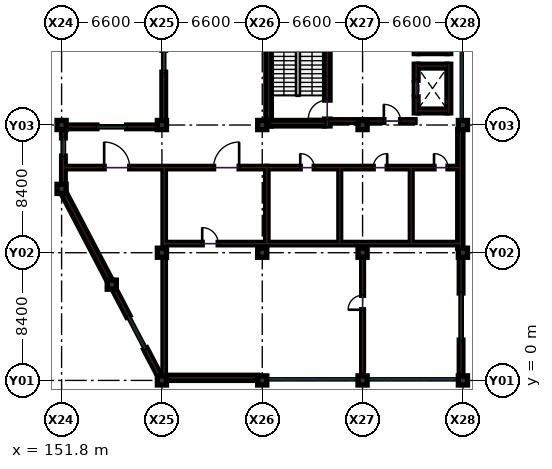
"""IFC4 building model, lengths in metres.
Left out: names, types, materials, properties, quantities, classifications, styles, units other than length and angle.
Written with IfcOpenShell. Run it as: python <this file> out.ifc"""

import sys

from ifc_helpers import new_model, si_unit, direction, frame, frame_2d, origin, origin_2d, place, context, subcontext, project, spatial, rectangle, extrude, element, fill, save


model = new_model("IFC4")
c1 = context("Model", 3, precision=1e-05, world=origin(), true_north=direction((0.0, 1.0)))
c2 = subcontext(c1, "Body", "Model", "MODEL_VIEW")
j1 = project(units=[si_unit("LENGTHUNIT", "METRE"), si_unit("PLANEANGLEUNIT", "RADIAN")], contexts=[c1])
p1 = place(None, origin())
s1 = spatial("IfcSite", under=j1, at=p1, CompositionType="ELEMENT")
p2 = place(p1, origin())
s2 = spatial("IfcBuilding", under=s1, at=p2, CompositionType="ELEMENT")
p3 = place(p2, frame((0.0, 0.0, 31.2)))
s3 = spatial("IfcBuildingStorey", under=s2, at=p3, CompositionType="ELEMENT", Elevation=31.2)
for number, where, z_axis, x_axis in (
    (1, (151.8, 16.8, 0.0), (0.0, 0.0, 1.0), (1.0, 0.0, 0.0)),
    (2, (158.4, 0.0, 0.0), (0.0, 0.0, 1.0), (1.0, 0.0, 0.0)),
    (3, (158.4, 8.4, 0.0), (0.0, 0.0, 1.0), (1.0, 0.0, 0.0)),
    (4, (158.4, 16.8, 0.0), (0.0, 0.0, 1.0), (1.0, 0.0, 0.0)),
    (5, (165.0, 0.0, 0.0), (0.0, 0.0, 1.0), (1.0, 0.0, 0.0)),
    (6, (165.0, 8.4, 0.0), (0.0, 0.0, 1.0), (1.0, 0.0, 0.0)),
    (7, (165.0, 16.8, 0.0), (0.0, 0.0, 1.0), (1.0, 0.0, 0.0)),
    (8, (171.6, 0.0, 0.0), (0.0, 0.0, 1.0), (1.0, 0.0, 0.0)),
    (9, (171.6, 8.4, 0.0), (0.0, 0.0, 1.0), (1.0, 0.0, 0.0)),
    (10, (171.6, 16.8, 0.0), (0.0, 0.0, 1.0), (1.0, 0.0, 0.0)),
    (11, (178.2, 0.0, 0.0), (0.0, 0.0, 1.0), (1.0, 0.0, 0.0)),
    (12, (178.2, 8.4, 0.0), (0.0, 0.0, 1.0), (1.0, 0.0, 0.0)),
    (13, (178.2, 16.8, 0.0), (0.0, 0.0, 1.0), (1.0, 0.0, 0.0)),
    (14, (151.8, 12.6, 0.0), (0.0, 0.0, 1.0), (1.0, 0.0, 0.0)),
    (15, (155.1, 6.3, 0.0), (0.0, 0.0, 1.0), (1.0, 0.0, 0.0)),
):
    element("IfcColumn", number, at=place(p3, frame(where, z_axis=z_axis, x_axis=x_axis)), inside=s3, PredefinedType="COLUMN", context=c2, shape_type="SweptSolid", body=[
        extrude(rectangle(XDim=0.6, YDim=0.6, at=origin_2d()), origin(), (0.0, 0.0, 1.0), 4.2),
    ])
p4 = place(p3, frame((165.3, 14.0, 0.0), z_axis=(0.0, 0.0, 1.0), x_axis=(1.0, 0.0, 0.0)))
e16 = element("IfcWall", 16, at=p4, inside=s3, PredefinedType="PARTITIONING", context=c2, shape_type="SweptSolid", body=[
    extrude(rectangle(XDim=12.7, YDim=0.16, at=frame_2d((6.35, 0.0))), origin(), (0.0, 0.0, 1.0), 3.23),
])
p5 = place(p4, frame((2.2, 0.0, 0.0)))
e17 = element("IfcOpeningElement", 17, at=p5, cuts=e16, PredefinedType="OPENING", context=c2, shape_type="SweptSolid", body=[
    extrude(rectangle(XDim=0.92, YDim=2.08, at=frame_2d((0.46, 1.04))), frame((0.0, 0.09, 0.0), z_axis=(0.0, -1.0, 0.0), x_axis=(1.0, 0.0, 0.0)), (0.0, 0.0, 1.0), 0.18),
])
p6 = place(p4, frame((7.0, 0.0, 0.0)))
e18 = element("IfcOpeningElement", 18, at=p6, cuts=e16, PredefinedType="OPENING", context=c2, shape_type="SweptSolid", body=[
    extrude(rectangle(XDim=0.92, YDim=2.08, at=frame_2d((0.46, 1.04))), frame((0.0, 0.09, 0.0), z_axis=(0.0, -1.0, 0.0), x_axis=(1.0, 0.0, 0.0)), (0.0, 0.0, 1.0), 0.18),
])
p7 = place(p4, frame((11.0, 0.0, 0.0)))
e19 = element("IfcOpeningElement", 19, at=p7, cuts=e16, PredefinedType="OPENING", context=c2, shape_type="SweptSolid", body=[
    extrude(rectangle(XDim=0.92, YDim=2.08, at=frame_2d((0.46, 1.04))), frame((0.0, 0.09, 0.0), z_axis=(0.0, -1.0, 0.0), x_axis=(1.0, 0.0, 0.0)), (0.0, 0.0, 1.0), 0.18),
])
p8 = place(p3, frame((165.3, 9.0, 0.0), z_axis=(0.0, 0.0, 1.0), x_axis=(1.0, 0.0, 0.0)))
e20 = element("IfcWall", 20, at=p8, inside=s3, PredefinedType="PARTITIONING", context=c2, shape_type="SweptSolid", body=[
    extrude(rectangle(XDim=12.7, YDim=0.16, at=frame_2d((6.35, 0.0))), origin(), (0.0, 0.0, 1.0), 3.23),
])
p9 = place(p3, frame((165.3, 9.0, 0.0), z_axis=(0.0, 0.0, 1.0), x_axis=(0.0, 1.0, 0.0)))
e21 = element("IfcWall", 21, at=p9, inside=s3, PredefinedType="PARTITIONING", context=c2, shape_type="SweptSolid", body=[
    extrude(rectangle(XDim=5.0, YDim=0.16, at=frame_2d((2.5, 0.0))), origin(), (0.0, 0.0, 1.0), 3.23),
])
for number, where, z_axis, x_axis in (
    (22, (170.1, 9.0, 0.0), (0.0, 0.0, 1.0), (0.0, 1.0, 0.0)),
    (23, (174.8, 9.0, 0.0), (0.0, 0.0, 1.0), (0.0, 1.0, 0.0)),
):
    element("IfcWall", number, at=place(p3, frame(where, z_axis=z_axis, x_axis=x_axis)), inside=s3, PredefinedType="PARTITIONING", context=c2, shape_type="SweptSolid", body=[
        extrude(rectangle(XDim=5.0, YDim=0.12, at=frame_2d((2.5, 0.0))), origin(), (0.0, 0.0, 1.0), 3.23),
    ])
p10 = place(p3, frame((158.55, 9.0, 0.0), z_axis=(0.0, 0.0, 1.0), x_axis=(1.0, 0.0, 0.0)))
e24 = element("IfcWall", 24, at=p10, inside=s3, PredefinedType="PARTITIONING", context=c2, shape_type="SweptSolid", body=[
    extrude(rectangle(XDim=6.75, YDim=0.16, at=frame_2d((3.375, 0.0))), origin(), (0.0, 0.0, 1.0), 3.23),
])
p11 = place(p10, frame((2.5, 0.0, 0.0)))
e25 = element("IfcOpeningElement", 25, at=p11, cuts=e24, PredefinedType="OPENING", context=c2, shape_type="SweptSolid", body=[
    extrude(rectangle(XDim=1.05, YDim=2.15, at=frame_2d((0.525, 1.075))), frame((0.0, 0.09, 0.0), z_axis=(0.0, -1.0, 0.0), x_axis=(1.0, 0.0, 0.0)), (0.0, 0.0, 1.0), 0.18),
])
p12 = place(p3, frame((171.6, 0.25, 0.0), z_axis=(0.0, 0.0, 1.0), x_axis=(0.0, 1.0, 0.0)))
e26 = element("IfcWall", 26, at=p12, inside=s3, PredefinedType="PARTITIONING", context=c2, shape_type="SweptSolid", body=[
    extrude(rectangle(XDim=7.7, YDim=0.12, at=frame_2d((3.85, 0.0))), origin(), (0.0, 0.0, 1.0), 3.23),
])
p13 = place(p12, frame((4.4, 0.0, 0.0)))
e27 = element("IfcOpeningElement", 27, at=p13, cuts=e26, PredefinedType="OPENING", context=c2, shape_type="SweptSolid", body=[
    extrude(rectangle(XDim=0.95, YDim=2.15, at=frame_2d((0.475, 1.075))), frame((0.0, 0.07, 0.0), z_axis=(0.0, -1.0, 0.0), x_axis=(1.0, 0.0, 0.0)), (0.0, 0.0, 1.0), 0.14),
])
p14 = place(p3, frame((158.55, 0.25, 0.0), z_axis=(0.0, 0.0, 1.0), x_axis=(0.0, 1.0, 0.0)))
e28 = element("IfcWall", 28, at=p14, inside=s3, PredefinedType="PARTITIONING", context=c2, shape_type="SweptSolid", body=[
    extrude(rectangle(XDim=7.7, YDim=0.16, at=frame_2d((3.85, 0.0))), origin(), (0.0, 0.0, 1.0), 3.23),
])
p15 = place(p3, frame((158.55, 8.85, 0.0), z_axis=(0.0, 0.0, 1.0), x_axis=(0.0, 1.0, 0.0)))
e29 = element("IfcWall", 29, at=p15, inside=s3, PredefinedType="PARTITIONING", context=c2, shape_type="SweptSolid", body=[
    extrude(rectangle(XDim=5.15, YDim=0.16, at=frame_2d((2.575, 0.0))), origin(), (0.0, 0.0, 1.0), 3.23),
])
p16 = place(p3, frame((152.0, 14.0, 0.0), z_axis=(0.0, 0.0, 1.0), x_axis=(1.0, 0.0, 0.0)))
e30 = element("IfcWall", 30, at=p16, inside=s3, PredefinedType="PARTITIONING", context=c2, shape_type="SweptSolid", body=[
    extrude(rectangle(XDim=13.3, YDim=0.16, at=frame_2d((6.65, 0.0))), origin(), (0.0, 0.0, 1.0), 3.23),
])
p17 = place(p16, frame((2.6, 0.0, 0.0)))
e31 = element("IfcOpeningElement", 31, at=p17, cuts=e30, PredefinedType="OPENING", context=c2, shape_type="SweptSolid", body=[
    extrude(rectangle(XDim=1.68, YDim=2.28, at=frame_2d((0.84, 1.14))), frame((0.0, 0.09, 0.0), z_axis=(0.0, -1.0, 0.0), x_axis=(1.0, 0.0, 0.0)), (0.0, 0.0, 1.0), 0.18),
])
p18 = place(p16, frame((9.8, 0.0, 0.0)))
e32 = element("IfcOpeningElement", 32, at=p18, cuts=e30, PredefinedType="OPENING", context=c2, shape_type="SweptSolid", body=[
    extrude(rectangle(XDim=1.68, YDim=2.28, at=frame_2d((0.84, 1.14))), frame((0.0, 0.09, 0.0), z_axis=(0.0, -1.0, 0.0), x_axis=(1.0, 0.0, 0.0)), (0.0, 0.0, 1.0), 0.18),
])
p19 = place(p3, frame((158.105, 16.68, 0.0), z_axis=(0.0, 0.0, 1.0), x_axis=(-1.0, 0.0, 0.0)))
e33 = element("IfcWall", 33, at=p19, inside=s3, PredefinedType="SOLIDWALL", context=c2, shape_type="SweptSolid", body=[
    extrude(rectangle(XDim=6.01, YDim=0.24, at=frame_2d((3.005, 0.0))), origin(), (0.0, 0.0, 1.0), 3.315),
])
p20 = place(p19, frame((2.03, 0.0, 0.95)))
e34 = element("IfcOpeningElement", 34, at=p20, cuts=e33, PredefinedType="OPENING", context=c2, shape_type="SweptSolid", body=[
    extrude(rectangle(XDim=1.95, YDim=1.55, at=frame_2d((0.975, 0.775))), frame((0.0, 0.13, 0.0), z_axis=(0.0, -1.0, 0.0), x_axis=(1.0, 0.0, 0.0)), (0.0, 0.0, 1.0), 0.26),
])
p21 = place(p3, frame((158.695, 0.17, 0.0), z_axis=(0.0, 0.0, 1.0), x_axis=(1.0, 0.0, 0.0)))
e35 = element("IfcWall", 35, at=p21, inside=s3, PredefinedType="SHEAR", context=c2, shape_type="SweptSolid", body=[
    extrude(rectangle(XDim=6.01, YDim=0.34, at=frame_2d((3.005, 0.0))), origin(), (0.0, 0.0, 1.0), 3.98),
])
p22 = place(p3, frame((158.52, 24.905, 0.0), z_axis=(0.0, 0.0, 1.0), x_axis=(0.0, -1.0, 0.0)))
e36 = element("IfcWall", 36, at=p22, inside=s3, PredefinedType="SOLIDWALL", context=c2, shape_type="SweptSolid", body=[
    extrude(rectangle(XDim=7.81, YDim=0.24, at=frame_2d((3.905, 0.0))), origin(), (0.0, 0.0, 1.0), 3.265),
])
p23 = place(p22, frame((3.18, 0.0, 0.95)))
e37 = element("IfcOpeningElement", 37, at=p23, cuts=e36, PredefinedType="OPENING", context=c2, shape_type="SweptSolid", body=[
    extrude(rectangle(XDim=1.45, YDim=1.6, at=frame_2d((0.725, 0.8))), frame((0.0, 0.13, 0.0), z_axis=(0.0, -1.0, 0.0), x_axis=(1.0, 0.0, 0.0)), (0.0, 0.0, 1.0), 0.26),
])
p24 = place(p3, frame((178.08, 0.295, 0.0), z_axis=(0.0, 0.0, 1.0), x_axis=(0.0, 1.0, 0.0)))
e38 = element("IfcWall", 38, at=p24, inside=s3, PredefinedType="SOLIDWALL", context=c2, shape_type="SweptSolid", body=[
    extrude(rectangle(XDim=7.81, YDim=0.24, at=frame_2d((3.905, 0.0))), origin(), (0.0, 0.0, 1.0), 3.265),
])
p25 = place(p24, frame((2.355, 0.0, 0.95)))
e39 = element("IfcOpeningElement", 39, at=p25, cuts=e38, PredefinedType="OPENING", context=c2, shape_type="SweptSolid", body=[
    extrude(rectangle(XDim=3.1, YDim=2.05, at=frame_2d((1.55, 1.025))), frame((0.0, 0.13, 0.0), z_axis=(0.0, -1.0, 0.0), x_axis=(1.0, 0.0, 0.0)), (0.0, 0.0, 1.0), 0.26),
])
p26 = place(p3, frame((178.03, 8.695, 0.0), z_axis=(0.0, 0.0, 1.0), x_axis=(0.0, 1.0, 0.0)))
e40 = element("IfcWall", 40, at=p26, inside=s3, PredefinedType="SHEAR", context=c2, shape_type="SweptSolid", body=[
    extrude(rectangle(XDim=7.81, YDim=0.34, at=frame_2d((3.905, 0.0))), origin(), (0.0, 0.0, 1.0), 3.98),
])
p27 = place(p3, frame((151.92, 16.505, 0.0), z_axis=(0.0, 0.0, 1.0), x_axis=(0.0, -1.0, 0.0)))
e41 = element("IfcWall", 41, at=p27, inside=s3, PredefinedType="SOLIDWALL", context=c2, shape_type="SweptSolid", body=[
    extrude(rectangle(XDim=3.61, YDim=0.24, at=frame_2d((1.805, 0.0))), origin(), (0.0, 0.0, 1.0), 3.365),
])
p28 = place(p27, frame((0.55, 0.0, 0.95)))
e42 = element("IfcOpeningElement", 42, at=p28, cuts=e41, PredefinedType="OPENING", context=c2, shape_type="SweptSolid", body=[
    extrude(rectangle(XDim=1.2, YDim=1.5, at=frame_2d((0.6, 0.75))), frame((0.0, 0.13, 0.0), z_axis=(0.0, -1.0, 0.0), x_axis=(1.0, 0.0, 0.0)), (0.0, 0.0, 1.0), 0.26),
])
p29 = place(p3, frame((151.95, 12.31, 0.0), z_axis=(0.0, 0.0, 1.0), x_axis=(0.464471613901, -0.885588007981, 0.0)))
e43 = element("IfcWall", 43, at=p29, inside=s3, PredefinedType="SHEAR", context=c2, shape_type="SweptSolid", body=[
    extrude(rectangle(XDim=6.459, YDim=0.34, at=frame_2d((3.229, 0.0))), origin(), (0.0, 0.0, 1.0), 3.98),
])
p30 = place(p3, frame((155.25, 6.01, 0.0), z_axis=(0.0, 0.0, 1.0), x_axis=(0.464471613901, -0.885588007981, 0.0)))
e44 = element("IfcWall", 44, at=p30, inside=s3, PredefinedType="SOLIDWALL", context=c2, shape_type="SweptSolid", body=[
    extrude(rectangle(XDim=6.459, YDim=0.24, at=frame_2d((3.229, 0.0))), origin(), (0.0, 0.0, 1.0), 3.365),
])
p31 = place(p30, frame((2.03, 0.0, 0.95)))
e45 = element("IfcOpeningElement", 45, at=p31, cuts=e44, PredefinedType="OPENING", context=c2, shape_type="SweptSolid", body=[
    extrude(rectangle(XDim=2.4, YDim=1.6, at=frame_2d((1.2, 0.8))), frame((0.0, 0.13, 0.0), z_axis=(0.0, -1.0, 0.0), x_axis=(1.0, 0.0, 0.0)), (0.0, 0.0, 1.0), 0.26),
])
p32 = place(p3, frame((165.42, 16.74, 0.0), z_axis=(0.0, 0.0, 1.0), x_axis=(0.0, 1.0, 0.0)))
e46 = element("IfcWall", 46, at=p32, inside=s3, PredefinedType="SHEAR", context=c2, shape_type="SweptSolid", body=[
    extrude(rectangle(XDim=8.37, YDim=0.36, at=frame_2d((4.185, 0.0))), origin(), (0.0, 0.0, 1.0), 3.98),
])
p33 = place(p3, frame((169.28, 16.74, 0.0), z_axis=(0.0, 0.0, 1.0), x_axis=(0.0, 1.0, 0.0)))
e47 = element("IfcWall", 47, at=p33, inside=s3, PredefinedType="SHEAR", context=c2, shape_type="SweptSolid", body=[
    extrude(rectangle(XDim=8.37, YDim=0.36, at=frame_2d((4.185, 0.0))), origin(), (0.0, 0.0, 1.0), 3.98),
])
p34 = place(p33, frame((0.45, 0.0, 0.0)))
e48 = element("IfcOpeningElement", 48, at=p34, cuts=e47, PredefinedType="OPENING", context=c2, shape_type="SweptSolid", body=[
    extrude(rectangle(XDim=1.25, YDim=2.15, at=frame_2d((0.625, 1.075))), frame((0.0, 0.19, 0.0), z_axis=(0.0, -1.0, 0.0), x_axis=(1.0, 0.0, 0.0)), (0.0, 0.0, 1.0), 0.38),
])
p35 = place(p3, frame((165.6, 16.92, 0.0), z_axis=(0.0, 0.0, 1.0), x_axis=(1.0, 0.0, 0.0)))
e49 = element("IfcWall", 49, at=p35, inside=s3, PredefinedType="SHEAR", context=c2, shape_type="SweptSolid", body=[
    extrude(rectangle(XDim=3.5, YDim=0.36, at=frame_2d((1.75, 0.0))), origin(), (0.0, 0.0, 1.0), 3.98),
])
p36 = place(p3, frame((175.125, 17.6, 0.0), z_axis=(0.0, 0.0, 1.0), x_axis=(0.0, 1.0, 0.0)))
e50 = element("IfcWall", 50, at=p36, inside=s3, PredefinedType="SHEAR", context=c2, shape_type="SweptSolid", body=[
    extrude(rectangle(XDim=3.2, YDim=0.25, at=frame_2d((1.6, 0.0))), origin(), (0.0, 0.0, 1.0), 3.98),
])
p37 = place(p36, frame((1.05, 0.0, 0.0)))
e51 = element("IfcOpeningElement", 51, at=p37, cuts=e50, PredefinedType="OPENING", context=c2, shape_type="SweptSolid", body=[
    extrude(rectangle(XDim=1.1, YDim=2.15, at=frame_2d((0.55, 1.075))), frame((0.0, 0.135, 0.0), z_axis=(0.0, -1.0, 0.0), x_axis=(1.0, 0.0, 0.0)), (0.0, 0.0, 1.0), 0.27),
])
p38 = place(p3, frame((177.275, 17.6, 0.0), z_axis=(0.0, 0.0, 1.0), x_axis=(0.0, 1.0, 0.0)))
e52 = element("IfcWall", 52, at=p38, inside=s3, PredefinedType="SHEAR", context=c2, shape_type="SweptSolid", body=[
    extrude(rectangle(XDim=3.2, YDim=0.25, at=frame_2d((1.6, 0.0))), origin(), (0.0, 0.0, 1.0), 3.98),
])
for number, where, z_axis, x_axis in (
    (53, (175.25, 17.725, 0.0), (0.0, 0.0, 1.0), (1.0, 0.0, 0.0)),
    (54, (175.25, 20.675, 0.0), (0.0, 0.0, 1.0), (1.0, 0.0, 0.0)),
):
    element("IfcWall", number, at=place(p3, frame(where, z_axis=z_axis, x_axis=x_axis)), inside=s3, PredefinedType="SHEAR", context=c2, shape_type="SweptSolid", body=[
        extrude(rectangle(XDim=1.9, YDim=0.25, at=frame_2d((0.95, 0.0))), origin(), (0.0, 0.0, 1.0), 3.98),
    ])
p39 = place(p3, frame((175.125, 21.5, 0.0), z_axis=(0.0, 0.0, 1.0), x_axis=(0.0, 1.0, 0.0)))
e55 = element("IfcWall", 55, at=p39, inside=s3, PredefinedType="SHEAR", context=c2, shape_type="SweptSolid", body=[
    extrude(rectangle(XDim=3.2, YDim=0.25, at=frame_2d((1.6, 0.0))), origin(), (0.0, 0.0, 1.0), 3.98),
])
p40 = place(p39, frame((1.05, 0.0, 0.0)))
e56 = element("IfcOpeningElement", 56, at=p40, cuts=e55, PredefinedType="OPENING", context=c2, shape_type="SweptSolid", body=[
    extrude(rectangle(XDim=1.1, YDim=2.15, at=frame_2d((0.55, 1.075))), frame((0.0, 0.135, 0.0), z_axis=(0.0, -1.0, 0.0), x_axis=(1.0, 0.0, 0.0)), (0.0, 0.0, 1.0), 0.27),
])
p41 = place(p3, frame((177.275, 21.5, 0.0), z_axis=(0.0, 0.0, 1.0), x_axis=(0.0, 1.0, 0.0)))
e57 = element("IfcWall", 57, at=p41, inside=s3, PredefinedType="SHEAR", context=c2, shape_type="SweptSolid", body=[
    extrude(rectangle(XDim=3.2, YDim=0.25, at=frame_2d((1.6, 0.0))), origin(), (0.0, 0.0, 1.0), 3.98),
])
p42 = place(p3, frame((175.25, 21.625, 0.0), z_axis=(0.0, 0.0, 1.0), x_axis=(1.0, 0.0, 0.0)))
e58 = element("IfcWall", 58, at=p42, inside=s3, PredefinedType="SHEAR", context=c2, shape_type="SweptSolid", body=[
    extrude(rectangle(XDim=1.9, YDim=0.25, at=frame_2d((0.95, 0.0))), origin(), (0.0, 0.0, 1.0), 3.98),
])
p43 = place(p3, frame((169.35, 17.06, 0.0), z_axis=(0.0, 0.0, 1.0), x_axis=(1.0, 0.0, 0.0)))
e59 = element("IfcWall", 59, at=p43, inside=s3, PredefinedType="SOLIDWALL", context=c2, shape_type="SweptSolid", body=[
    extrude(rectangle(XDim=5.7, YDim=0.18, at=frame_2d((2.85, 0.0))), origin(), (0.0, 0.0, 1.0), 3.315),
])
p44 = place(p43, frame((3.65, 0.0, 0.0)))
e60 = element("IfcOpeningElement", 60, at=p44, cuts=e59, PredefinedType="OPENING", context=c2, shape_type="SweptSolid", body=[
    extrude(rectangle(XDim=1.1, YDim=2.15, at=frame_2d((0.55, 1.075))), frame((0.0, 0.1, 0.0), z_axis=(0.0, -1.0, 0.0), x_axis=(1.0, 0.0, 0.0)), (0.0, 0.0, 1.0), 0.2),
])
p45 = place(p5, origin())
e61 = element("IfcDoor", 61, at=p45, inside=s3, OperationType="SINGLE_SWING_LEFT", PredefinedType="DOOR", context=c2, shape_type="SweptSolid", body=[
    extrude(rectangle(XDim=0.92, YDim=2.08, at=frame_2d((0.46, 1.04))), frame((0.0, 0.025, 0.0), z_axis=(0.0, -1.0, 0.0), x_axis=(1.0, 0.0, 0.0)), (0.0, 0.0, 1.0), 0.05),
])
fill(e17, e61)
p46 = place(p6, origin())
e62 = element("IfcDoor", 62, at=p46, inside=s3, OperationType="SINGLE_SWING_RIGHT", PredefinedType="DOOR", context=c2, shape_type="SweptSolid", body=[
    extrude(rectangle(XDim=0.92, YDim=2.08, at=frame_2d((0.46, 1.04))), frame((0.0, 0.025, 0.0), z_axis=(0.0, -1.0, 0.0), x_axis=(1.0, 0.0, 0.0)), (0.0, 0.0, 1.0), 0.05),
])
fill(e18, e62)
p47 = place(p7, origin())
e63 = element("IfcDoor", 63, at=p47, inside=s3, OperationType="SINGLE_SWING_LEFT", PredefinedType="DOOR", context=c2, shape_type="SweptSolid", body=[
    extrude(rectangle(XDim=0.92, YDim=2.08, at=frame_2d((0.46, 1.04))), frame((0.0, 0.025, 0.0), z_axis=(0.0, -1.0, 0.0), x_axis=(1.0, 0.0, 0.0)), (0.0, 0.0, 1.0), 0.05),
])
fill(e19, e63)
p48 = place(p11, origin())
e64 = element("IfcDoor", 64, at=p48, inside=s3, OperationType="SINGLE_SWING_LEFT", PredefinedType="DOOR", context=c2, shape_type="SweptSolid", body=[
    extrude(rectangle(XDim=1.05, YDim=2.15, at=frame_2d((0.525, 1.075))), frame((0.0, 0.025, 0.0), z_axis=(0.0, -1.0, 0.0), x_axis=(1.0, 0.0, 0.0)), (0.0, 0.0, 1.0), 0.05),
])
fill(e25, e64)
p49 = place(p13, origin())
e65 = element("IfcDoor", 65, at=p49, inside=s3, OperationType="SINGLE_SWING_LEFT", PredefinedType="DOOR", context=c2, shape_type="SweptSolid", body=[
    extrude(rectangle(XDim=0.95, YDim=2.15, at=frame_2d((0.475, 1.075))), frame((0.0, 0.025, 0.0), z_axis=(0.0, -1.0, 0.0), x_axis=(1.0, 0.0, 0.0)), (0.0, 0.0, 1.0), 0.05),
])
fill(e27, e65)
p50 = place(p17, origin())
e66 = element("IfcDoor", 66, at=p50, inside=s3, OperationType="SINGLE_SWING_LEFT", PredefinedType="DOOR", context=c2, shape_type="SweptSolid", body=[
    extrude(rectangle(XDim=1.68, YDim=2.28, at=frame_2d((0.84, 1.14))), frame((0.0, 0.025, 0.0), z_axis=(0.0, -1.0, 0.0), x_axis=(1.0, 0.0, 0.0)), (0.0, 0.0, 1.0), 0.05),
])
fill(e31, e66)
p51 = place(p18, origin())
e67 = element("IfcDoor", 67, at=p51, inside=s3, OperationType="SINGLE_SWING_RIGHT", PredefinedType="DOOR", context=c2, shape_type="SweptSolid", body=[
    extrude(rectangle(XDim=1.68, YDim=2.28, at=frame_2d((0.84, 1.14))), frame((0.0, 0.025, 0.0), z_axis=(0.0, -1.0, 0.0), x_axis=(1.0, 0.0, 0.0)), (0.0, 0.0, 1.0), 0.05),
])
fill(e32, e67)
p52 = place(p20, origin())
e68 = element("IfcWindow", 68, at=p52, inside=s3, PartitioningType="SINGLE_PANEL", PredefinedType="WINDOW", context=c2, shape_type="SweptSolid", body=[
    extrude(rectangle(XDim=1.95, YDim=1.55, at=frame_2d((0.975, 0.775))), frame((0.0, 0.03, 0.0), z_axis=(0.0, -1.0, 0.0), x_axis=(1.0, 0.0, 0.0)), (0.0, 0.0, 1.0), 0.06),
])
fill(e34, e68)
p53 = place(p23, origin())
e69 = element("IfcWindow", 69, at=p53, inside=s3, PartitioningType="SINGLE_PANEL", PredefinedType="WINDOW", context=c2, shape_type="SweptSolid", body=[
    extrude(rectangle(XDim=1.45, YDim=1.6, at=frame_2d((0.725, 0.8))), frame((0.0, 0.03, 0.0), z_axis=(0.0, -1.0, 0.0), x_axis=(1.0, 0.0, 0.0)), (0.0, 0.0, 1.0), 0.06),
])
fill(e37, e69)
p54 = place(p25, origin())
e70 = element("IfcWindow", 70, at=p54, inside=s3, PartitioningType="SINGLE_PANEL", PredefinedType="WINDOW", context=c2, shape_type="SweptSolid", body=[
    extrude(rectangle(XDim=3.1, YDim=2.05, at=frame_2d((1.55, 1.025))), frame((0.0, 0.03, 0.0), z_axis=(0.0, -1.0, 0.0), x_axis=(1.0, 0.0, 0.0)), (0.0, 0.0, 1.0), 0.06),
])
fill(e39, e70)
p55 = place(p28, origin())
e71 = element("IfcWindow", 71, at=p55, inside=s3, PartitioningType="SINGLE_PANEL", PredefinedType="WINDOW", context=c2, shape_type="SweptSolid", body=[
    extrude(rectangle(XDim=1.2, YDim=1.5, at=frame_2d((0.6, 0.75))), frame((0.0, 0.03, 0.0), z_axis=(0.0, -1.0, 0.0), x_axis=(1.0, 0.0, 0.0)), (0.0, 0.0, 1.0), 0.06),
])
fill(e42, e71)
p56 = place(p31, origin())
e72 = element("IfcWindow", 72, at=p56, inside=s3, PartitioningType="SINGLE_PANEL", PredefinedType="WINDOW", context=c2, shape_type="SweptSolid", body=[
    extrude(rectangle(XDim=2.4, YDim=1.6, at=frame_2d((1.2, 0.8))), frame((0.0, 0.03, 0.0), z_axis=(0.0, -1.0, 0.0), x_axis=(1.0, 0.0, 0.0)), (0.0, 0.0, 1.0), 0.06),
])
fill(e45, e72)
p57 = place(p34, origin())
e73 = element("IfcDoor", 73, at=p57, inside=s3, OperationType="SINGLE_SWING_LEFT", PredefinedType="DOOR", context=c2, shape_type="SweptSolid", body=[
    extrude(rectangle(XDim=1.25, YDim=2.15, at=frame_2d((0.625, 1.075))), frame((0.0, 0.025, 0.0), z_axis=(0.0, -1.0, 0.0), x_axis=(1.0, 0.0, 0.0)), (0.0, 0.0, 1.0), 0.05),
])
fill(e48, e73)
p58 = place(p37, origin())
e74 = element("IfcDoor", 74, at=p58, inside=s3, OperationType="SLIDING_TO_LEFT", PredefinedType="DOOR", context=c2, shape_type="SweptSolid", body=[
    extrude(rectangle(XDim=1.1, YDim=2.15, at=frame_2d((0.55, 1.075))), frame((0.0, 0.025, 0.0), z_axis=(0.0, -1.0, 0.0), x_axis=(1.0, 0.0, 0.0)), (0.0, 0.0, 1.0), 0.05),
])
fill(e51, e74)
p59 = place(p44, origin())
e75 = element("IfcDoor", 75, at=p59, inside=s3, OperationType="SINGLE_SWING_LEFT", PredefinedType="DOOR", context=c2, shape_type="SweptSolid", body=[
    extrude(rectangle(XDim=1.1, YDim=2.15, at=frame_2d((0.55, 1.075))), frame((0.0, 0.025, 0.0), z_axis=(0.0, -1.0, 0.0), x_axis=(1.0, 0.0, 0.0)), (0.0, 0.0, 1.0), 0.05),
])
fill(e60, e75)
save(model, sys.argv[1])
